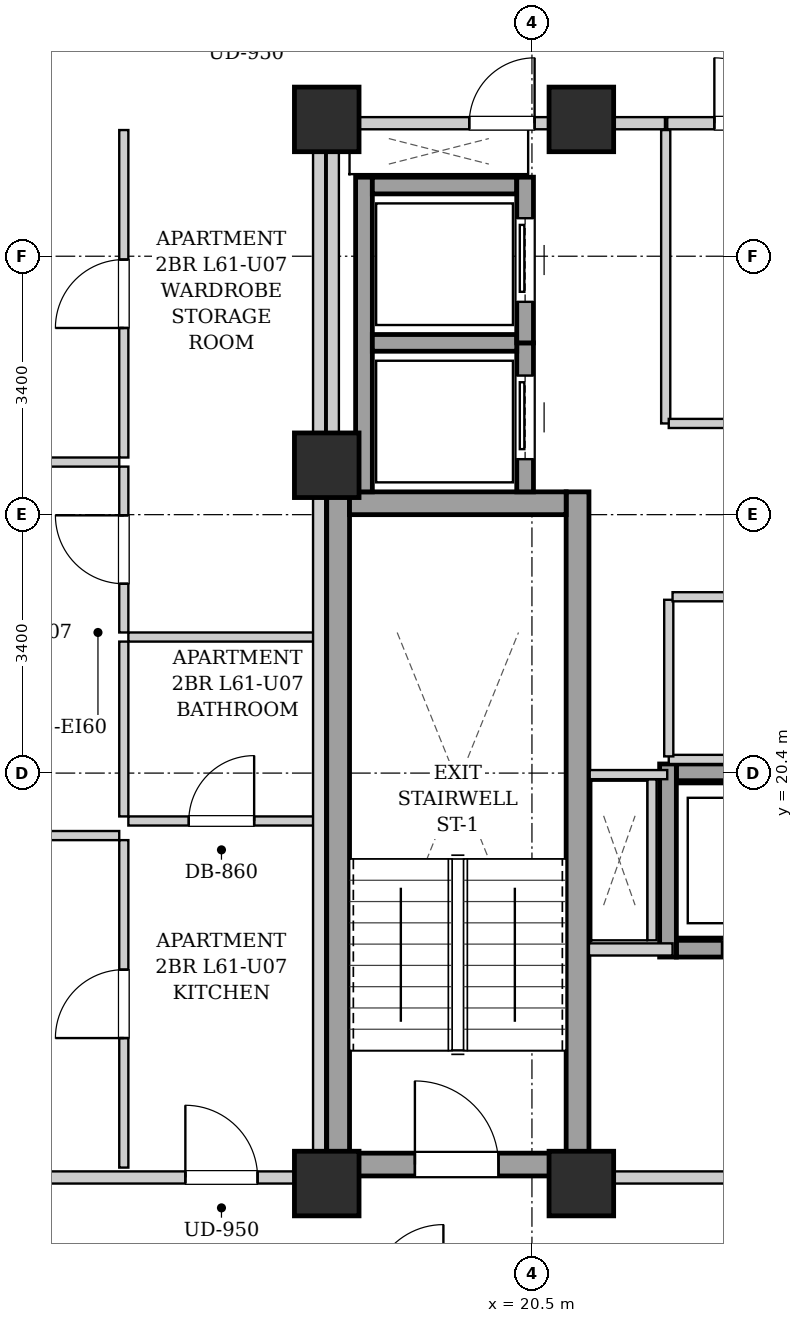
"""IFC4 building model, lengths in metres.
Left out: names, types, materials, properties, quantities, classifications, styles, units other than length and angle.
Written with IfcOpenShell. Run it as: python <this file> out.ifc"""

import sys

from ifc_helpers import new_model, si_unit, direction, frame, frame_2d, origin, origin_2d, place, context, subcontext, project, spatial, rectangle, extrude, element, fill, save


model = new_model("IFC4")
c1 = context("Model", 3, precision=1e-05, world=origin(), true_north=direction((0.0, 1.0)))
c2 = subcontext(c1, "Body", "Model", "MODEL_VIEW")
j1 = project(units=[si_unit("LENGTHUNIT", "METRE"), si_unit("PLANEANGLEUNIT", "RADIAN")], contexts=[c1])
p1 = place(None, origin())
s1 = spatial("IfcSite", under=j1, at=p1, CompositionType="ELEMENT")
p2 = place(p1, origin())
s2 = spatial("IfcBuilding", under=s1, at=p2, CompositionType="ELEMENT")
p3 = place(p2, frame((0.0, 0.0, 210.7)))
s3 = spatial("IfcBuildingStorey", under=s2, at=p3, CompositionType="ELEMENT", Elevation=210.7)
for number, where, z_axis, x_axis in (
    (1, (17.8, 15.0, 0.0), (0.0, 0.0, 1.0), (1.0, 0.0, 0.0)),
    (2, (21.15, 15.0, 0.0), (0.0, 0.0, 1.0), (1.0, 0.0, 0.0)),
    (3, (17.8, 29.0, 0.0), (0.0, 0.0, 1.0), (1.0, 0.0, 0.0)),
    (4, (21.15, 29.0, 0.0), (0.0, 0.0, 1.0), (1.0, 0.0, 0.0)),
    (5, (17.8, 24.45, 0.0), (0.0, 0.0, 1.0), (1.0, 0.0, 0.0)),
):
    element("IfcColumn", number, at=place(p3, frame(where, z_axis=z_axis, x_axis=x_axis)), inside=s3, PredefinedType="COLUMN", context=c2, shape_type="SweptSolid", body=[
        extrude(rectangle(XDim=0.85, YDim=0.85, at=origin_2d()), origin(), (0.0, 0.0, 1.0), 3.3),
    ])
for number, where, z_axis, x_axis in (
    (6, (17.95, 15.1, 0.0), (0.0, 0.0, 1.0), (0.0, 1.0, 0.0)),
    (7, (21.1, 15.1, 0.0), (0.0, 0.0, 1.0), (0.0, 1.0, 0.0)),
):
    element("IfcWall", number, at=place(p3, frame(where, z_axis=z_axis, x_axis=x_axis)), inside=s3, PredefinedType="SHEAR", context=c2, shape_type="SweptSolid", body=[
        extrude(rectangle(XDim=9.0, YDim=0.3, at=frame_2d((4.5, 0.0))), origin(), (0.0, 0.0, 1.0), 3.04),
    ])
p4 = place(p3, frame((18.1, 23.95, 0.0), z_axis=(0.0, 0.0, 1.0), x_axis=(1.0, 0.0, 0.0)))
e8 = element("IfcWall", 8, at=p4, inside=s3, PredefinedType="SHEAR", context=c2, shape_type="SweptSolid", body=[
    extrude(rectangle(XDim=2.85, YDim=0.3, at=frame_2d((1.425, 0.0))), origin(), (0.0, 0.0, 1.0), 3.04),
])
p5 = place(p3, frame((18.1, 15.25, 0.0), z_axis=(0.0, 0.0, 1.0), x_axis=(1.0, 0.0, 0.0)))
e9 = element("IfcWall", 9, at=p5, inside=s3, PredefinedType="SHEAR", context=c2, shape_type="SweptSolid", body=[
    extrude(rectangle(XDim=2.85, YDim=0.3, at=frame_2d((1.425, 0.0))), origin(), (0.0, 0.0, 1.0), 3.04),
])
p6 = place(p5, frame((0.86, 0.0, 0.0)))
e10 = element("IfcOpeningElement", 10, at=p6, cuts=e9, PredefinedType="OPENING", context=c2, shape_type="SweptSolid", body=[
    extrude(rectangle(XDim=1.1, YDim=2.05, at=frame_2d((0.55, 1.025))), frame((0.0, 0.16, 0.0), z_axis=(0.0, -1.0, 0.0), x_axis=(1.0, 0.0, 0.0)), (0.0, 0.0, 1.0), 0.32),
])
p7 = place(p3, frame((18.29, 24.1, 0.0), z_axis=(0.0, 0.0, 1.0), x_axis=(0.0, 1.0, 0.0)))
e11 = element("IfcWall", 11, at=p7, inside=s3, PredefinedType="SHEAR", context=c2, shape_type="SweptSolid", body=[
    extrude(rectangle(XDim=4.14, YDim=0.22, at=frame_2d((2.07, 0.0))), origin(), (0.0, 0.0, 1.0), 3.04),
])
p8 = place(p3, frame((20.41, 24.1, 0.0), z_axis=(0.0, 0.0, 1.0), x_axis=(0.0, 1.0, 0.0)))
e12 = element("IfcWall", 12, at=p8, inside=s3, PredefinedType="SHEAR", context=c2, shape_type="SweptSolid", body=[
    extrude(rectangle(XDim=1.96, YDim=0.22, at=frame_2d((0.98, 0.0))), origin(), (0.0, 0.0, 1.0), 3.04),
])
p9 = place(p8, frame((0.43, 0.0, 0.0)))
e13 = element("IfcOpeningElement", 13, at=p9, cuts=e12, PredefinedType="OPENING", context=c2, shape_type="SweptSolid", body=[
    extrude(rectangle(XDim=1.1, YDim=2.15, at=frame_2d((0.55, 1.075))), frame((0.0, 0.12, 0.0), z_axis=(0.0, -1.0, 0.0), x_axis=(1.0, 0.0, 0.0)), (0.0, 0.0, 1.0), 0.24),
])
for number, where, z_axis, x_axis in (
    (14, (18.4, 26.06, 0.0), (0.0, 0.0, 1.0), (1.0, 0.0, 0.0)),
    (15, (18.4, 28.13, 0.0), (0.0, 0.0, 1.0), (1.0, 0.0, 0.0)),
):
    element("IfcWall", number, at=place(p3, frame(where, z_axis=z_axis, x_axis=x_axis)), inside=s3, PredefinedType="SHEAR", context=c2, shape_type="SweptSolid", body=[
        extrude(rectangle(XDim=1.9, YDim=0.22, at=frame_2d((0.95, 0.0))), origin(), (0.0, 0.0, 1.0), 3.04),
    ])
p10 = place(p3, frame((20.41, 26.06, 0.0), z_axis=(0.0, 0.0, 1.0), x_axis=(0.0, 1.0, 0.0)))
e16 = element("IfcWall", 16, at=p10, inside=s3, PredefinedType="SHEAR", context=c2, shape_type="SweptSolid", body=[
    extrude(rectangle(XDim=2.18, YDim=0.22, at=frame_2d((1.09, 0.0))), origin(), (0.0, 0.0, 1.0), 3.04),
])
p11 = place(p10, frame((0.54, 0.0, 0.0)))
e17 = element("IfcOpeningElement", 17, at=p11, cuts=e16, PredefinedType="OPENING", context=c2, shape_type="SweptSolid", body=[
    extrude(rectangle(XDim=1.1, YDim=2.15, at=frame_2d((0.55, 1.075))), frame((0.0, 0.12, 0.0), z_axis=(0.0, -1.0, 0.0), x_axis=(1.0, 0.0, 0.0)), (0.0, 0.0, 1.0), 0.24),
])
p12 = place(p3, frame((22.4, 18.09, 0.0), z_axis=(0.0, 0.0, 1.0), x_axis=(1.0, 0.0, 0.0)))
e18 = element("IfcWall", 18, at=p12, inside=s3, PredefinedType="SHEAR", context=c2, shape_type="SweptSolid", body=[
    extrude(rectangle(XDim=2.4, YDim=0.22, at=frame_2d((1.2, 0.0))), origin(), (0.0, 0.0, 1.0), 3.04),
])
p13 = place(p12, frame((0.6, 0.0, 0.0)))
e19 = element("IfcOpeningElement", 19, at=p13, cuts=e18, PredefinedType="OPENING", context=c2, shape_type="SweptSolid", body=[
    extrude(rectangle(XDim=1.2, YDim=2.15, at=frame_2d((0.6, 1.075))), frame((0.0, 0.12, 0.0), z_axis=(0.0, -1.0, 0.0), x_axis=(1.0, 0.0, 0.0)), (0.0, 0.0, 1.0), 0.24),
])
p14 = place(p3, frame((22.4, 20.41, 0.0), z_axis=(0.0, 0.0, 1.0), x_axis=(1.0, 0.0, 0.0)))
e20 = element("IfcWall", 20, at=p14, inside=s3, PredefinedType="SHEAR", context=c2, shape_type="SweptSolid", body=[
    extrude(rectangle(XDim=2.4, YDim=0.22, at=frame_2d((1.2, 0.0))), origin(), (0.0, 0.0, 1.0), 3.04),
])
p15 = place(p3, frame((22.29, 17.98, 0.0), z_axis=(0.0, 0.0, 1.0), x_axis=(0.0, 1.0, 0.0)))
e21 = element("IfcWall", 21, at=p15, inside=s3, PredefinedType="SHEAR", context=c2, shape_type="SweptSolid", body=[
    extrude(rectangle(XDim=2.54, YDim=0.22, at=frame_2d((1.27, 0.0))), origin(), (0.0, 0.0, 1.0), 3.04),
])
p16 = place(p3, frame((21.25, 15.08, 0.0), z_axis=(0.0, 0.0, 1.0), x_axis=(1.0, 0.0, 0.0)))
e22 = element("IfcWall", 22, at=p16, inside=s3, PredefinedType="PARTITIONING", context=c2, shape_type="SweptSolid", body=[
    extrude(rectangle(XDim=8.5, YDim=0.16, at=frame_2d((4.25, 0.0))), origin(), (0.0, 0.0, 1.0), 2.556),
])
p17 = place(p16, frame((3.725, 0.0, 0.0)))
e23 = element("IfcOpeningElement", 23, at=p17, cuts=e22, PredefinedType="OPENING", context=c2, shape_type="SweptSolid", body=[
    extrude(rectangle(XDim=1.05, YDim=2.05, at=frame_2d((0.525, 1.025))), frame((0.0, 0.09, 0.0), z_axis=(0.0, -1.0, 0.0), x_axis=(1.0, 0.0, 0.0)), (0.0, 0.0, 1.0), 0.18),
])
p18 = place(p3, frame((21.25, 18.08, 0.0), z_axis=(0.0, 0.0, 1.0), x_axis=(1.0, 0.0, 0.0)))
e24 = element("IfcWall", 24, at=p18, inside=s3, PredefinedType="PARTITIONING", context=c2, shape_type="SweptSolid", body=[
    extrude(rectangle(XDim=1.1, YDim=0.16, at=frame_2d((0.55, 0.0))), origin(), (0.0, 0.0, 1.0), 3.04),
])
p19 = place(p3, frame((17.88, 24.12, 0.0), z_axis=(0.0, 0.0, 1.0), x_axis=(0.0, 1.0, 0.0)))
e25 = element("IfcWall", 25, at=p19, inside=s3, PredefinedType="PARTITIONING", context=c2, shape_type="SweptSolid", body=[
    extrude(rectangle(XDim=4.76, YDim=0.16, at=frame_2d((2.38, 0.0))), origin(), (0.0, 0.0, 1.0), 3.04),
])
p20 = place(p3, frame((17.96, 28.95, 0.0), z_axis=(0.0, 0.0, 1.0), x_axis=(1.0, 0.0, 0.0)))
e26 = element("IfcWall", 26, at=p20, inside=s3, PredefinedType="PARTITIONING", context=c2, shape_type="SweptSolid", body=[
    extrude(rectangle(XDim=4.29, YDim=0.16, at=frame_2d((2.145, 0.0))), origin(), (0.0, 0.0, 1.0), 2.556),
])
p21 = place(p20, frame((1.715, 0.0, 0.0)))
e27 = element("IfcOpeningElement", 27, at=p21, cuts=e26, PredefinedType="OPENING", context=c2, shape_type="SweptSolid", body=[
    extrude(rectangle(XDim=0.86, YDim=2.05, at=frame_2d((0.43, 1.025))), frame((0.0, 0.09, 0.0), z_axis=(0.0, -1.0, 0.0), x_axis=(1.0, 0.0, 0.0)), (0.0, 0.0, 1.0), 0.18),
])
p22 = place(p3, frame((22.08, 18.2, 0.0), z_axis=(0.0, 0.0, 1.0), x_axis=(0.0, 1.0, 0.0)))
e28 = element("IfcWall", 28, at=p22, inside=s3, PredefinedType="PARTITIONING", context=c2, shape_type="SweptSolid", body=[
    extrude(rectangle(XDim=2.12, YDim=0.12, at=frame_2d((1.06, 0.0))), origin(), (0.0, 0.0, 1.0), 3.04),
])
p23 = place(p3, frame((22.28, 20.38, 0.0), z_axis=(0.0, 0.0, 1.0), x_axis=(-1.0, 0.0, 0.0)))
e29 = element("IfcWall", 29, at=p23, inside=s3, PredefinedType="PARTITIONING", context=c2, shape_type="SweptSolid", body=[
    extrude(rectangle(XDim=1.02, YDim=0.12, at=frame_2d((0.51, 0.0))), origin(), (0.0, 0.0, 1.0), 3.04),
])
p24 = place(p3, frame((22.26, 25.0, 0.0), z_axis=(0.0, 0.0, 1.0), x_axis=(0.0, 1.0, 0.0)))
e30 = element("IfcWall", 30, at=p24, inside=s3, PredefinedType="PARTITIONING", context=c2, shape_type="SweptSolid", body=[
    extrude(rectangle(XDim=3.86, YDim=0.12, at=frame_2d((1.93, 0.0))), origin(), (0.0, 0.0, 1.0), 3.04),
])
p25 = place(p3, frame((22.3, 25.0, 0.0), z_axis=(0.0, 0.0, 1.0), x_axis=(1.0, 0.0, 0.0)))
e31 = element("IfcWall", 31, at=p25, inside=s3, PredefinedType="PARTITIONING", context=c2, shape_type="SweptSolid", body=[
    extrude(rectangle(XDim=2.04, YDim=0.12, at=frame_2d((1.02, 0.0))), origin(), (0.0, 0.0, 1.0), 3.04),
])
p26 = place(p3, frame((22.28, 28.95, 0.0), z_axis=(0.0, 0.0, 1.0), x_axis=(1.0, 0.0, 0.0)))
e32 = element("IfcWall", 32, at=p26, inside=s3, PredefinedType="PARTITIONING", context=c2, shape_type="SweptSolid", body=[
    extrude(rectangle(XDim=2.06, YDim=0.16, at=frame_2d((1.03, 0.0))), origin(), (0.0, 0.0, 1.0), 2.556),
])
p27 = place(p26, frame((0.62, 0.0, 0.0)))
e33 = element("IfcOpeningElement", 33, at=p27, cuts=e32, PredefinedType="OPENING", context=c2, shape_type="SweptSolid", body=[
    extrude(rectangle(XDim=0.86, YDim=2.05, at=frame_2d((0.43, 1.025))), frame((0.0, 0.09, 0.0), z_axis=(0.0, -1.0, 0.0), x_axis=(1.0, 0.0, 0.0)), (0.0, 0.0, 1.0), 0.18),
])
p28 = place(p3, frame((22.3, 20.58, 0.0), z_axis=(0.0, 0.0, 1.0), x_axis=(1.0, 0.0, 0.0)))
e34 = element("IfcWall", 34, at=p28, inside=s3, PredefinedType="PARTITIONING", context=c2, shape_type="SweptSolid", body=[
    extrude(rectangle(XDim=7.35, YDim=0.12, at=frame_2d((3.675, 0.0))), origin(), (0.0, 0.0, 1.0), 3.04),
])
p29 = place(p3, frame((22.3, 20.62, 0.0), z_axis=(0.0, 0.0, 1.0), x_axis=(0.0, 1.0, 0.0)))
e35 = element("IfcWall", 35, at=p29, inside=s3, PredefinedType="PARTITIONING", context=c2, shape_type="SweptSolid", body=[
    extrude(rectangle(XDim=2.06, YDim=0.12, at=frame_2d((1.03, 0.0))), origin(), (0.0, 0.0, 1.0), 3.04),
])
p30 = place(p3, frame((22.35, 22.72, 0.0), z_axis=(0.0, 0.0, 1.0), x_axis=(1.0, 0.0, 0.0)))
e36 = element("IfcWall", 36, at=p30, inside=s3, PredefinedType="PARTITIONING", context=c2, shape_type="SweptSolid", body=[
    extrude(rectangle(XDim=7.27, YDim=0.12, at=frame_2d((3.635, 0.0))), origin(), (0.0, 0.0, 1.0), 3.04),
])
p31 = place(p30, frame((1.175, 0.0, 0.0)))
e37 = element("IfcOpeningElement", 37, at=p31, cuts=e36, PredefinedType="OPENING", context=c2, shape_type="SweptSolid", body=[
    extrude(rectangle(XDim=0.9, YDim=2.05, at=frame_2d((0.45, 1.025))), frame((0.0, 0.07, 0.0), z_axis=(0.0, -1.0, 0.0), x_axis=(1.0, 0.0, 0.0)), (0.0, 0.0, 1.0), 0.14),
])
p32 = place(p30, frame((4.725, 0.0, 0.0)))
e38 = element("IfcOpeningElement", 38, at=p32, cuts=e36, PredefinedType="OPENING", context=c2, shape_type="SweptSolid", body=[
    extrude(rectangle(XDim=0.9, YDim=2.05, at=frame_2d((0.45, 1.025))), frame((0.0, 0.07, 0.0), z_axis=(0.0, -1.0, 0.0), x_axis=(1.0, 0.0, 0.0)), (0.0, 0.0, 1.0), 0.14),
])
p33 = place(p3, frame((10.88, 15.08, 0.0), z_axis=(0.0, 0.0, 1.0), x_axis=(1.0, 0.0, 0.0)))
e39 = element("IfcWall", 39, at=p33, inside=s3, PredefinedType="PARTITIONING", context=c2, shape_type="SweptSolid", body=[
    extrude(rectangle(XDim=6.88, YDim=0.16, at=frame_2d((3.44, 0.0))), origin(), (0.0, 0.0, 1.0), 2.556),
])
p34 = place(p33, frame((5.06, 0.0, 0.0)))
e40 = element("IfcOpeningElement", 40, at=p34, cuts=e39, PredefinedType="OPENING", context=c2, shape_type="SweptSolid", body=[
    extrude(rectangle(XDim=0.95, YDim=2.1, at=frame_2d((0.475, 1.05))), frame((0.0, 0.09, 0.0), z_axis=(0.0, -1.0, 0.0), x_axis=(1.0, 0.0, 0.0)), (0.0, 0.0, 1.0), 0.18),
])
p35 = place(p3, frame((15.19, 22.19, 0.0), z_axis=(0.0, 0.0, 1.0), x_axis=(1.0, 0.0, 0.0)))
e41 = element("IfcWall", 41, at=p35, inside=s3, PredefinedType="PARTITIONING", context=c2, shape_type="SweptSolid", body=[
    extrude(rectangle(XDim=2.45, YDim=0.12, at=frame_2d((1.225, 0.0))), origin(), (0.0, 0.0, 1.0), 3.04),
])
p36 = place(p3, frame((15.13, 22.25, 0.0), z_axis=(0.0, 0.0, 1.0), x_axis=(0.0, 1.0, 0.0)))
e42 = element("IfcWall", 42, at=p36, inside=s3, PredefinedType="PARTITIONING", context=c2, shape_type="SweptSolid", body=[
    extrude(rectangle(XDim=2.182, YDim=0.12, at=frame_2d((1.091, 0.0))), origin(), (0.0, 0.0, 1.0), 3.04),
])
p37 = place(p36, frame((0.641, 0.0, 0.0)))
e43 = element("IfcOpeningElement", 43, at=p37, cuts=e42, PredefinedType="OPENING", context=c2, shape_type="SweptSolid", body=[
    extrude(rectangle(XDim=0.9, YDim=2.05, at=frame_2d((0.45, 1.025))), frame((0.0, 0.07, 0.0), z_axis=(0.0, -1.0, 0.0), x_axis=(1.0, 0.0, 0.0)), (0.0, 0.0, 1.0), 0.14),
])
p38 = place(p3, frame((15.13, 24.552, 0.0), z_axis=(0.0, 0.0, 1.0), x_axis=(0.0, 1.0, 0.0)))
e44 = element("IfcWall", 44, at=p38, inside=s3, PredefinedType="PARTITIONING", context=c2, shape_type="SweptSolid", body=[
    extrude(rectangle(XDim=4.308, YDim=0.12, at=frame_2d((2.154, 0.0))), origin(), (0.0, 0.0, 1.0), 3.04),
])
p39 = place(p38, frame((1.704, 0.0, 0.0)))
e45 = element("IfcOpeningElement", 45, at=p39, cuts=e44, PredefinedType="OPENING", context=c2, shape_type="SweptSolid", body=[
    extrude(rectangle(XDim=0.9, YDim=2.05, at=frame_2d((0.45, 1.025))), frame((0.0, 0.07, 0.0), z_axis=(0.0, -1.0, 0.0), x_axis=(1.0, 0.0, 0.0)), (0.0, 0.0, 1.0), 0.14),
])
p40 = place(p3, frame((15.19, 19.77, 0.0), z_axis=(0.0, 0.0, 1.0), x_axis=(1.0, 0.0, 0.0)))
e46 = element("IfcWall", 46, at=p40, inside=s3, PredefinedType="PARTITIONING", context=c2, shape_type="SweptSolid", body=[
    extrude(rectangle(XDim=2.45, YDim=0.12, at=frame_2d((1.225, 0.0))), origin(), (0.0, 0.0, 1.0), 3.04),
])
p41 = place(p40, frame((0.795, 0.0, 0.0)))
e47 = element("IfcOpeningElement", 47, at=p41, cuts=e46, PredefinedType="OPENING", context=c2, shape_type="SweptSolid", body=[
    extrude(rectangle(XDim=0.86, YDim=2.05, at=frame_2d((0.43, 1.025))), frame((0.0, 0.07, 0.0), z_axis=(0.0, -1.0, 0.0), x_axis=(1.0, 0.0, 0.0)), (0.0, 0.0, 1.0), 0.14),
])
p42 = place(p3, frame((15.13, 19.83, 0.0), z_axis=(0.0, 0.0, 1.0), x_axis=(0.0, 1.0, 0.0)))
e48 = element("IfcWall", 48, at=p42, inside=s3, PredefinedType="PARTITIONING", context=c2, shape_type="SweptSolid", body=[
    extrude(rectangle(XDim=2.3, YDim=0.12, at=frame_2d((1.15, 0.0))), origin(), (0.0, 0.0, 1.0), 3.04),
])
p43 = place(p3, frame((15.13, 15.21, 0.0), z_axis=(0.0, 0.0, 1.0), x_axis=(0.0, 1.0, 0.0)))
e49 = element("IfcWall", 49, at=p43, inside=s3, PredefinedType="PARTITIONING", context=c2, shape_type="SweptSolid", body=[
    extrude(rectangle(XDim=4.308, YDim=0.12, at=frame_2d((2.154, 0.0))), origin(), (0.0, 0.0, 1.0), 3.04),
])
p44 = place(p43, frame((1.704, 0.0, 0.0)))
e50 = element("IfcOpeningElement", 50, at=p44, cuts=e49, PredefinedType="OPENING", context=c2, shape_type="SweptSolid", body=[
    extrude(rectangle(XDim=0.9, YDim=2.05, at=frame_2d((0.45, 1.025))), frame((0.0, 0.07, 0.0), z_axis=(0.0, -1.0, 0.0), x_axis=(1.0, 0.0, 0.0)), (0.0, 0.0, 1.0), 0.14),
])
p45 = place(p3, frame((10.88, 19.578, 0.0), z_axis=(0.0, 0.0, 1.0), x_axis=(1.0, 0.0, 0.0)))
e51 = element("IfcWall", 51, at=p45, inside=s3, PredefinedType="PARTITIONING", context=c2, shape_type="SweptSolid", body=[
    extrude(rectangle(XDim=4.19, YDim=0.12, at=frame_2d((2.095, 0.0))), origin(), (0.0, 0.0, 1.0), 3.04),
])
p46 = place(p45, frame((1.63, 0.0, 0.0)))
e52 = element("IfcOpeningElement", 52, at=p46, cuts=e51, PredefinedType="OPENING", context=c2, shape_type="SweptSolid", body=[
    extrude(rectangle(XDim=0.9, YDim=2.05, at=frame_2d((0.45, 1.025))), frame((0.0, 0.07, 0.0), z_axis=(0.0, -1.0, 0.0), x_axis=(1.0, 0.0, 0.0)), (0.0, 0.0, 1.0), 0.14),
])
p47 = place(p3, frame((10.88, 24.492, 0.0), z_axis=(0.0, 0.0, 1.0), x_axis=(1.0, 0.0, 0.0)))
e53 = element("IfcWall", 53, at=p47, inside=s3, PredefinedType="PARTITIONING", context=c2, shape_type="SweptSolid", body=[
    extrude(rectangle(XDim=4.19, YDim=0.12, at=frame_2d((2.095, 0.0))), origin(), (0.0, 0.0, 1.0), 2.722),
])
p48 = place(p47, frame((1.63, 0.0, 0.0)))
e54 = element("IfcOpeningElement", 54, at=p48, cuts=e53, PredefinedType="OPENING", context=c2, shape_type="SweptSolid", body=[
    extrude(rectangle(XDim=0.9, YDim=2.05, at=frame_2d((0.45, 1.025))), frame((0.0, 0.07, 0.0), z_axis=(0.0, -1.0, 0.0), x_axis=(1.0, 0.0, 0.0)), (0.0, 0.0, 1.0), 0.14),
])
p49 = place(p3, frame((17.7, 15.02, 0.0), z_axis=(0.0, 0.0, 1.0), x_axis=(0.0, 1.0, 0.0)))
e55 = element("IfcWall", 55, at=p49, inside=s3, PredefinedType="PARTITIONING", context=c2, shape_type="SweptSolid", body=[
    extrude(rectangle(XDim=13.98, YDim=0.16, at=frame_2d((6.99, 0.0))), origin(), (0.0, 0.0, 1.0), 3.04),
])
p50 = place(p6, origin())
e56 = element("IfcDoor", 56, at=p50, inside=s3, OperationType="SINGLE_SWING_LEFT", PredefinedType="DOOR", context=c2, shape_type="SweptSolid", body=[
    extrude(rectangle(XDim=1.1, YDim=2.05, at=frame_2d((0.55, 1.025))), frame((0.0, 0.025, 0.0), z_axis=(0.0, -1.0, 0.0), x_axis=(1.0, 0.0, 0.0)), (0.0, 0.0, 1.0), 0.05),
])
fill(e10, e56)
p51 = place(p9, origin())
e57 = element("IfcDoor", 57, at=p51, inside=s3, OperationType="SLIDING_TO_LEFT", PredefinedType="DOOR", context=c2, shape_type="SweptSolid", body=[
    extrude(rectangle(XDim=1.1, YDim=2.15, at=frame_2d((0.55, 1.075))), frame((0.0, 0.025, 0.0), z_axis=(0.0, -1.0, 0.0), x_axis=(1.0, 0.0, 0.0)), (0.0, 0.0, 1.0), 0.05),
])
fill(e13, e57)
p52 = place(p11, origin())
e58 = element("IfcDoor", 58, at=p52, inside=s3, OperationType="SLIDING_TO_LEFT", PredefinedType="DOOR", context=c2, shape_type="SweptSolid", body=[
    extrude(rectangle(XDim=1.1, YDim=2.15, at=frame_2d((0.55, 1.075))), frame((0.0, 0.025, 0.0), z_axis=(0.0, -1.0, 0.0), x_axis=(1.0, 0.0, 0.0)), (0.0, 0.0, 1.0), 0.05),
])
fill(e17, e58)
p53 = place(p13, origin())
e59 = element("IfcDoor", 59, at=p53, inside=s3, OperationType="SLIDING_TO_LEFT", PredefinedType="DOOR", context=c2, shape_type="SweptSolid", body=[
    extrude(rectangle(XDim=1.2, YDim=2.15, at=frame_2d((0.6, 1.075))), frame((0.0, 0.025, 0.0), z_axis=(0.0, -1.0, 0.0), x_axis=(1.0, 0.0, 0.0)), (0.0, 0.0, 1.0), 0.05),
])
fill(e19, e59)
p54 = place(p21, origin())
e60 = element("IfcDoor", 60, at=p54, inside=s3, OperationType="SINGLE_SWING_RIGHT", PredefinedType="DOOR", context=c2, shape_type="SweptSolid", body=[
    extrude(rectangle(XDim=0.86, YDim=2.05, at=frame_2d((0.43, 1.025))), frame((0.0, 0.025, 0.0), z_axis=(0.0, -1.0, 0.0), x_axis=(1.0, 0.0, 0.0)), (0.0, 0.0, 1.0), 0.05),
])
fill(e27, e60)
p55 = place(p27, origin())
e61 = element("IfcDoor", 61, at=p55, inside=s3, OperationType="SINGLE_SWING_LEFT", PredefinedType="DOOR", context=c2, shape_type="SweptSolid", body=[
    extrude(rectangle(XDim=0.86, YDim=2.05, at=frame_2d((0.43, 1.025))), frame((0.0, 0.025, 0.0), z_axis=(0.0, -1.0, 0.0), x_axis=(1.0, 0.0, 0.0)), (0.0, 0.0, 1.0), 0.05),
])
fill(e33, e61)
p56 = place(p34, origin())
e62 = element("IfcDoor", 62, at=p56, inside=s3, OperationType="SINGLE_SWING_LEFT", PredefinedType="DOOR", context=c2, shape_type="SweptSolid", body=[
    extrude(rectangle(XDim=0.95, YDim=2.1, at=frame_2d((0.475, 1.05))), frame((0.0, 0.025, 0.0), z_axis=(0.0, -1.0, 0.0), x_axis=(1.0, 0.0, 0.0)), (0.0, 0.0, 1.0), 0.05),
])
fill(e40, e62)
p57 = place(p37, origin())
e63 = element("IfcDoor", 63, at=p57, inside=s3, OperationType="SINGLE_SWING_RIGHT", PredefinedType="DOOR", context=c2, shape_type="SweptSolid", body=[
    extrude(rectangle(XDim=0.9, YDim=2.05, at=frame_2d((0.45, 1.025))), frame((0.0, 0.025, 0.0), z_axis=(0.0, -1.0, 0.0), x_axis=(1.0, 0.0, 0.0)), (0.0, 0.0, 1.0), 0.05),
])
fill(e43, e63)
p58 = place(p39, origin())
e64 = element("IfcDoor", 64, at=p58, inside=s3, OperationType="SINGLE_SWING_LEFT", PredefinedType="DOOR", context=c2, shape_type="SweptSolid", body=[
    extrude(rectangle(XDim=0.9, YDim=2.05, at=frame_2d((0.45, 1.025))), frame((0.0, 0.025, 0.0), z_axis=(0.0, -1.0, 0.0), x_axis=(1.0, 0.0, 0.0)), (0.0, 0.0, 1.0), 0.05),
])
fill(e45, e64)
p59 = place(p41, origin())
e65 = element("IfcDoor", 65, at=p59, inside=s3, OperationType="SINGLE_SWING_RIGHT", PredefinedType="DOOR", context=c2, shape_type="SweptSolid", body=[
    extrude(rectangle(XDim=0.86, YDim=2.05, at=frame_2d((0.43, 1.025))), frame((0.0, 0.025, 0.0), z_axis=(0.0, -1.0, 0.0), x_axis=(1.0, 0.0, 0.0)), (0.0, 0.0, 1.0), 0.05),
])
fill(e47, e65)
p60 = place(p44, origin())
e66 = element("IfcDoor", 66, at=p60, inside=s3, OperationType="SINGLE_SWING_LEFT", PredefinedType="DOOR", context=c2, shape_type="SweptSolid", body=[
    extrude(rectangle(XDim=0.9, YDim=2.05, at=frame_2d((0.45, 1.025))), frame((0.0, 0.025, 0.0), z_axis=(0.0, -1.0, 0.0), x_axis=(1.0, 0.0, 0.0)), (0.0, 0.0, 1.0), 0.05),
])
fill(e50, e66)
save(model, sys.argv[1])
